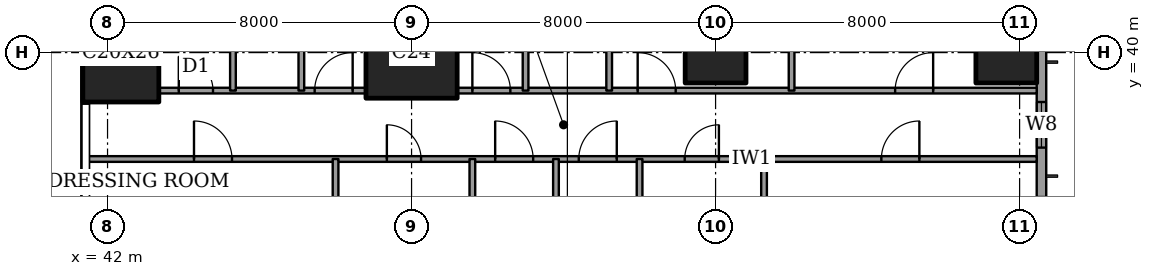
"""IFC4 building model, lengths in metres.
Left out: names, types, materials, properties, quantities, classifications, styles, units other than length and angle.
Written with IfcOpenShell. Run it as: python <this file> out.ifc"""

import sys

from ifc_helpers import new_model, si_unit, direction, frame, frame_2d, origin, origin_2d, place, context, subcontext, project, spatial, rectangle, extrude, element, fill, save


model = new_model("IFC4")
c1 = context("Model", 3, precision=1e-05, world=origin(), true_north=direction((0.0, 1.0)))
c2 = subcontext(c1, "Body", "Model", "MODEL_VIEW")
j1 = project(units=[si_unit("LENGTHUNIT", "METRE"), si_unit("PLANEANGLEUNIT", "RADIAN")], contexts=[c1])
p1 = place(None, origin())
s1 = spatial("IfcSite", under=j1, at=p1, CompositionType="ELEMENT")
p2 = place(p1, origin())
s2 = spatial("IfcBuilding", under=s1, at=p2, CompositionType="ELEMENT")
p3 = place(p2, frame((0.0, 0.0, 241.2)))
s3 = spatial("IfcBuildingStorey", under=s2, at=p3, CompositionType="ELEMENT", Elevation=241.2)
p4 = place(p3, frame((42.35, 40.0, 0.0), z_axis=(0.0, 0.0, 1.0), x_axis=(1.0, 0.0, 0.0)))
e1 = element("IfcColumn", 1, at=p4, inside=s3, PredefinedType="COLUMN", context=c2, shape_type="SweptSolid", body=[
    extrude(rectangle(XDim=2.0, YDim=2.6, at=origin_2d()), origin(), (0.0, 0.0, 1.0), 3.6),
])
p5 = place(p3, frame((50.0, 40.0, 0.0), z_axis=(0.0, 0.0, 1.0), x_axis=(1.0, 0.0, 0.0)))
e2 = element("IfcColumn", 2, at=p5, inside=s3, PredefinedType="COLUMN", context=c2, shape_type="SweptSolid", body=[
    extrude(rectangle(XDim=2.4, YDim=2.4, at=origin_2d()), origin(), (0.0, 0.0, 1.0), 3.6),
])
for number, where, z_axis, x_axis in (
    (3, (58.0, 40.0, 0.0), (0.0, 0.0, 1.0), (1.0, 0.0, 0.0)),
    (4, (65.65, 40.0, 0.0), (0.0, 0.0, 1.0), (1.0, 0.0, 0.0)),
):
    element("IfcColumn", number, at=place(p3, frame(where, z_axis=z_axis, x_axis=x_axis)), inside=s3, PredefinedType="COLUMN", context=c2, shape_type="SweptSolid", body=[
        extrude(rectangle(XDim=1.6, YDim=1.6, at=origin_2d()), origin(), (0.0, 0.0, 1.0), 3.6),
    ])
p6 = place(p3, frame((66.575, 3.175, 0.0), z_axis=(0.0, 0.0, 1.0), x_axis=(0.0, 1.0, 0.0)))
e5 = element("IfcWall", 5, at=p6, inside=s3, PredefinedType="SOLIDWALL", context=c2, shape_type="SweptSolid", body=[
    extrude(rectangle(XDim=41.65, YDim=0.25, at=frame_2d((20.825, 0.0))), origin(), (0.0, 0.0, 1.0), 3.6),
])
p7 = place(p6, frame((0.875, 0.0, 0.6)))
e6 = element("IfcOpeningElement", 6, at=p7, cuts=e5, PredefinedType="OPENING", context=c2, shape_type="SweptSolid", body=[
    extrude(rectangle(XDim=2.4, YDim=2.0, at=frame_2d((1.2, 1.0))), frame((0.0, 0.135, 0.0), z_axis=(0.0, -1.0, 0.0), x_axis=(1.0, 0.0, 0.0)), (0.0, 0.0, 1.0), 0.27),
])
p8 = place(p6, frame((6.0, 0.0, 0.6)))
e7 = element("IfcOpeningElement", 7, at=p8, cuts=e5, PredefinedType="OPENING", context=c2, shape_type="SweptSolid", body=[
    extrude(rectangle(XDim=1.2, YDim=2.0, at=frame_2d((0.6, 1.0))), frame((0.0, 0.135, 0.0), z_axis=(0.0, -1.0, 0.0), x_axis=(1.0, 0.0, 0.0)), (0.0, 0.0, 1.0), 0.27),
])
p9 = place(p6, frame((8.525, 0.0, 0.6)))
e8 = element("IfcOpeningElement", 8, at=p9, cuts=e5, PredefinedType="OPENING", context=c2, shape_type="SweptSolid", body=[
    extrude(rectangle(XDim=2.4, YDim=2.0, at=frame_2d((1.2, 1.0))), frame((0.0, 0.135, 0.0), z_axis=(0.0, -1.0, 0.0), x_axis=(1.0, 0.0, 0.0)), (0.0, 0.0, 1.0), 0.27),
])
p10 = place(p6, frame((15.725, 0.0, 0.6)))
e9 = element("IfcOpeningElement", 9, at=p10, cuts=e5, PredefinedType="OPENING", context=c2, shape_type="SweptSolid", body=[
    extrude(rectangle(XDim=2.4, YDim=2.0, at=frame_2d((1.2, 1.0))), frame((0.0, 0.135, 0.0), z_axis=(0.0, -1.0, 0.0), x_axis=(1.0, 0.0, 0.0)), (0.0, 0.0, 1.0), 0.27),
])
p11 = place(p6, frame((23.525, 0.0, 0.6)))
e10 = element("IfcOpeningElement", 10, at=p11, cuts=e5, PredefinedType="OPENING", context=c2, shape_type="SweptSolid", body=[
    extrude(rectangle(XDim=2.4, YDim=2.0, at=frame_2d((1.2, 1.0))), frame((0.0, 0.135, 0.0), z_axis=(0.0, -1.0, 0.0), x_axis=(1.0, 0.0, 0.0)), (0.0, 0.0, 1.0), 0.27),
])
p12 = place(p6, frame((30.625, 0.0, 0.6)))
e11 = element("IfcOpeningElement", 11, at=p12, cuts=e5, PredefinedType="OPENING", context=c2, shape_type="SweptSolid", body=[
    extrude(rectangle(XDim=2.4, YDim=2.0, at=frame_2d((1.2, 1.0))), frame((0.0, 0.135, 0.0), z_axis=(0.0, -1.0, 0.0), x_axis=(1.0, 0.0, 0.0)), (0.0, 0.0, 1.0), 0.27),
])
p13 = place(p6, frame((34.325, 0.0, 0.6)))
e12 = element("IfcOpeningElement", 12, at=p13, cuts=e5, PredefinedType="OPENING", context=c2, shape_type="SweptSolid", body=[
    extrude(rectangle(XDim=1.2, YDim=2.0, at=frame_2d((0.6, 1.0))), frame((0.0, 0.135, 0.0), z_axis=(0.0, -1.0, 0.0), x_axis=(1.0, 0.0, 0.0)), (0.0, 0.0, 1.0), 0.27),
])
p14 = place(p6, frame((38.375, 0.0, 0.6)))
e13 = element("IfcOpeningElement", 13, at=p14, cuts=e5, PredefinedType="OPENING", context=c2, shape_type="SweptSolid", body=[
    extrude(rectangle(XDim=2.4, YDim=2.0, at=frame_2d((1.2, 1.0))), frame((0.0, 0.135, 0.0), z_axis=(0.0, -1.0, 0.0), x_axis=(1.0, 0.0, 0.0)), (0.0, 0.0, 1.0), 0.27),
])
p15 = place(p3, frame((41.439, 37.2, 0.0), z_axis=(0.0, 0.0, 1.0), x_axis=(1.0, 0.0, 0.0)))
e14 = element("IfcWall", 14, at=p15, inside=s3, PredefinedType="PARTITIONING", context=c2, shape_type="SweptSolid", body=[
    extrude(rectangle(XDim=25.011, YDim=0.15, at=frame_2d((12.505, 0.0))), origin(), (0.0, 0.0, 1.0), 3.35),
])
p16 = place(p15, frame((10.761, 0.0, 0.0)))
e15 = element("IfcOpeningElement", 15, at=p16, cuts=e14, PredefinedType="OPENING", context=c2, shape_type="SweptSolid", body=[
    extrude(rectangle(XDim=1.0, YDim=2.1, at=frame_2d((0.5, 1.05))), frame((0.0, 0.085, 0.0), z_axis=(0.0, -1.0, 0.0), x_axis=(1.0, 0.0, 0.0)), (0.0, 0.0, 1.0), 0.17),
])
p17 = place(p15, frame((20.924, 0.0, 0.0)))
e16 = element("IfcOpeningElement", 16, at=p17, cuts=e14, PredefinedType="OPENING", context=c2, shape_type="SweptSolid", body=[
    extrude(rectangle(XDim=1.0, YDim=2.1, at=frame_2d((0.5, 1.05))), frame((0.0, 0.085, 0.0), z_axis=(0.0, -1.0, 0.0), x_axis=(1.0, 0.0, 0.0)), (0.0, 0.0, 1.0), 0.17),
])
p18 = place(p15, frame((15.749, 0.0, 0.0)))
e17 = element("IfcOpeningElement", 17, at=p18, cuts=e14, PredefinedType="OPENING", context=c2, shape_type="SweptSolid", body=[
    extrude(rectangle(XDim=0.9, YDim=2.1, at=frame_2d((0.45, 1.05))), frame((0.0, 0.085, 0.0), z_axis=(0.0, -1.0, 0.0), x_axis=(1.0, 0.0, 0.0)), (0.0, 0.0, 1.0), 0.17),
])
p19 = place(p15, frame((12.961, 0.0, 0.0)))
e18 = element("IfcOpeningElement", 18, at=p19, cuts=e14, PredefinedType="OPENING", context=c2, shape_type="SweptSolid", body=[
    extrude(rectangle(XDim=1.0, YDim=2.1, at=frame_2d((0.5, 1.05))), frame((0.0, 0.085, 0.0), z_axis=(0.0, -1.0, 0.0), x_axis=(1.0, 0.0, 0.0)), (0.0, 0.0, 1.0), 0.17),
])
p20 = place(p15, frame((7.911, 0.0, 0.0)))
e19 = element("IfcOpeningElement", 19, at=p20, cuts=e14, PredefinedType="OPENING", context=c2, shape_type="SweptSolid", body=[
    extrude(rectangle(XDim=0.9, YDim=2.1, at=frame_2d((0.45, 1.05))), frame((0.0, 0.085, 0.0), z_axis=(0.0, -1.0, 0.0), x_axis=(1.0, 0.0, 0.0)), (0.0, 0.0, 1.0), 0.17),
])
p21 = place(p15, frame((2.836, 0.0, 0.0)))
e20 = element("IfcOpeningElement", 20, at=p21, cuts=e14, PredefinedType="OPENING", context=c2, shape_type="SweptSolid", body=[
    extrude(rectangle(XDim=1.0, YDim=2.1, at=frame_2d((0.5, 1.05))), frame((0.0, 0.085, 0.0), z_axis=(0.0, -1.0, 0.0), x_axis=(1.0, 0.0, 0.0)), (0.0, 0.0, 1.0), 0.17),
])
p22 = place(p3, frame((43.35, 39.0, 0.0), z_axis=(0.0, 0.0, 1.0), x_axis=(1.0, 0.0, 0.0)))
e21 = element("IfcWall", 21, at=p22, inside=s3, PredefinedType="PARTITIONING", context=c2, shape_type="SweptSolid", body=[
    extrude(rectangle(XDim=5.45, YDim=0.15, at=frame_2d((2.725, 0.0))), origin(), (0.0, 0.0, 1.0), 3.35),
])
p23 = place(p22, frame((4.1, 0.0, 0.0)))
e22 = element("IfcOpeningElement", 22, at=p23, cuts=e21, PredefinedType="OPENING", context=c2, shape_type="SweptSolid", body=[
    extrude(rectangle(XDim=1.0, YDim=2.1, at=frame_2d((0.5, 1.05))), frame((0.0, 0.085, 0.0), z_axis=(0.0, -1.0, 0.0), x_axis=(1.0, 0.0, 0.0)), (0.0, 0.0, 1.0), 0.17),
])
p24 = place(p22, frame((0.525, 0.0, 0.0)))
e23 = element("IfcOpeningElement", 23, at=p24, cuts=e21, PredefinedType="OPENING", context=c2, shape_type="SweptSolid", body=[
    extrude(rectangle(XDim=0.9, YDim=2.1, at=frame_2d((0.45, 1.05))), frame((0.0, 0.085, 0.0), z_axis=(0.0, -1.0, 0.0), x_axis=(1.0, 0.0, 0.0)), (0.0, 0.0, 1.0), 0.17),
])
p25 = place(p3, frame((51.2, 39.0, 0.0), z_axis=(0.0, 0.0, 1.0), x_axis=(1.0, 0.0, 0.0)))
e24 = element("IfcWall", 24, at=p25, inside=s3, PredefinedType="PARTITIONING", context=c2, shape_type="SweptSolid", body=[
    extrude(rectangle(XDim=15.25, YDim=0.15, at=frame_2d((7.625, 0.0))), origin(), (0.0, 0.0, 1.0), 3.35),
])
p26 = place(p25, frame((11.525, 0.0, 0.0)))
e25 = element("IfcOpeningElement", 25, at=p26, cuts=e24, PredefinedType="OPENING", context=c2, shape_type="SweptSolid", body=[
    extrude(rectangle(XDim=1.0, YDim=2.1, at=frame_2d((0.5, 1.05))), frame((0.0, 0.085, 0.0), z_axis=(0.0, -1.0, 0.0), x_axis=(1.0, 0.0, 0.0)), (0.0, 0.0, 1.0), 0.17),
])
p27 = place(p25, frame((4.75, 0.0, 0.0)))
e26 = element("IfcOpeningElement", 26, at=p27, cuts=e24, PredefinedType="OPENING", context=c2, shape_type="SweptSolid", body=[
    extrude(rectangle(XDim=1.0, YDim=2.1, at=frame_2d((0.5, 1.05))), frame((0.0, 0.085, 0.0), z_axis=(0.0, -1.0, 0.0), x_axis=(1.0, 0.0, 0.0)), (0.0, 0.0, 1.0), 0.17),
])
p28 = place(p25, frame((0.4, 0.0, 0.0)))
e27 = element("IfcOpeningElement", 27, at=p28, cuts=e24, PredefinedType="OPENING", context=c2, shape_type="SweptSolid", body=[
    extrude(rectangle(XDim=1.0, YDim=2.1, at=frame_2d((0.5, 1.05))), frame((0.0, 0.085, 0.0), z_axis=(0.0, -1.0, 0.0), x_axis=(1.0, 0.0, 0.0)), (0.0, 0.0, 1.0), 0.17),
])
p29 = place(p3, frame((45.3, 39.0, 0.0), z_axis=(0.0, 0.0, 1.0), x_axis=(0.0, 1.0, 0.0)))
e28 = element("IfcWall", 28, at=p29, inside=s3, PredefinedType="PARTITIONING", context=c2, shape_type="SweptSolid", body=[
    extrude(rectangle(XDim=9.45, YDim=0.15, at=frame_2d((4.725, 0.0))), origin(), (0.0, 0.0, 1.0), 3.35),
])
p30 = place(p3, frame((47.1, 39.0, 0.0), z_axis=(0.0, 0.0, 1.0), x_axis=(0.0, 1.0, 0.0)))
e29 = element("IfcWall", 29, at=p30, inside=s3, PredefinedType="PARTITIONING", context=c2, shape_type="SweptSolid", body=[
    extrude(rectangle(XDim=4.7, YDim=0.15, at=frame_2d((2.35, 0.0))), origin(), (0.0, 0.0, 1.0), 3.35),
])
p31 = place(p30, frame((1.9, 0.0, 0.0)))
e30 = element("IfcOpeningElement", 30, at=p31, cuts=e29, PredefinedType="OPENING", context=c2, shape_type="SweptSolid", body=[
    extrude(rectangle(XDim=0.9, YDim=2.1, at=frame_2d((0.45, 1.05))), frame((0.0, 0.085, 0.0), z_axis=(0.0, -1.0, 0.0), x_axis=(1.0, 0.0, 0.0)), (0.0, 0.0, 1.0), 0.17),
])
p32 = place(p3, frame((48.0, 28.0, 0.0), z_axis=(0.0, 0.0, 1.0), x_axis=(0.0, 1.0, 0.0)))
e31 = element("IfcWall", 31, at=p32, inside=s3, PredefinedType="PARTITIONING", context=c2, shape_type="SweptSolid", body=[
    extrude(rectangle(XDim=9.2, YDim=0.15, at=frame_2d((4.6, 0.0))), origin(), (0.0, 0.0, 1.0), 3.35),
])
p33 = place(p32, frame((0.5, 0.0, 0.0)))
e32 = element("IfcOpeningElement", 32, at=p33, cuts=e31, PredefinedType="OPENING", context=c2, shape_type="SweptSolid", body=[
    extrude(rectangle(XDim=1.0, YDim=2.1, at=frame_2d((0.5, 1.05))), frame((0.0, 0.085, 0.0), z_axis=(0.0, -1.0, 0.0), x_axis=(1.0, 0.0, 0.0)), (0.0, 0.0, 1.0), 0.17),
])
p34 = place(p3, frame((51.6, 30.0, 0.0), z_axis=(0.0, 0.0, 1.0), x_axis=(0.0, 1.0, 0.0)))
e33 = element("IfcWall", 33, at=p34, inside=s3, PredefinedType="PARTITIONING", context=c2, shape_type="SweptSolid", body=[
    extrude(rectangle(XDim=7.2, YDim=0.15, at=frame_2d((3.6, 0.0))), origin(), (0.0, 0.0, 1.0), 3.35),
])
p35 = place(p3, frame((53.0, 39.0, 0.0), z_axis=(0.0, 0.0, 1.0), x_axis=(0.0, 1.0, 0.0)))
e34 = element("IfcWall", 34, at=p35, inside=s3, PredefinedType="PARTITIONING", context=c2, shape_type="SweptSolid", body=[
    extrude(rectangle(XDim=9.45, YDim=0.15, at=frame_2d((4.725, 0.0))), origin(), (0.0, 0.0, 1.0), 3.35),
])
p36 = place(p3, frame((53.8, 30.0, 0.0), z_axis=(0.0, 0.0, 1.0), x_axis=(0.0, 1.0, 0.0)))
e35 = element("IfcWall", 35, at=p36, inside=s3, PredefinedType="PARTITIONING", context=c2, shape_type="SweptSolid", body=[
    extrude(rectangle(XDim=7.2, YDim=0.15, at=frame_2d((3.6, 0.0))), origin(), (0.0, 0.0, 1.0), 3.35),
])
p37 = place(p3, frame((55.2, 39.0, 0.0), z_axis=(0.0, 0.0, 1.0), x_axis=(0.0, 1.0, 0.0)))
e36 = element("IfcWall", 36, at=p37, inside=s3, PredefinedType="PARTITIONING", context=c2, shape_type="SweptSolid", body=[
    extrude(rectangle(XDim=3.4, YDim=0.15, at=frame_2d((1.7, 0.0))), origin(), (0.0, 0.0, 1.0), 3.35),
])
p38 = place(p37, frame((1.25, 0.0, 0.0)))
e37 = element("IfcOpeningElement", 37, at=p38, cuts=e36, PredefinedType="OPENING", context=c2, shape_type="SweptSolid", body=[
    extrude(rectangle(XDim=0.9, YDim=2.1, at=frame_2d((0.45, 1.05))), frame((0.0, 0.085, 0.0), z_axis=(0.0, -1.0, 0.0), x_axis=(1.0, 0.0, 0.0)), (0.0, 0.0, 1.0), 0.17),
])
p39 = place(p3, frame((56.0, 28.0, 0.0), z_axis=(0.0, 0.0, 1.0), x_axis=(0.0, 1.0, 0.0)))
e38 = element("IfcWall", 38, at=p39, inside=s3, PredefinedType="PARTITIONING", context=c2, shape_type="SweptSolid", body=[
    extrude(rectangle(XDim=9.2, YDim=0.15, at=frame_2d((4.6, 0.0))), origin(), (0.0, 0.0, 1.0), 3.35),
])
p40 = place(p39, frame((0.5, 0.0, 0.0)))
e39 = element("IfcOpeningElement", 39, at=p40, cuts=e38, PredefinedType="OPENING", context=c2, shape_type="SweptSolid", body=[
    extrude(rectangle(XDim=1.0, YDim=2.1, at=frame_2d((0.5, 1.05))), frame((0.0, 0.085, 0.0), z_axis=(0.0, -1.0, 0.0), x_axis=(1.0, 0.0, 0.0)), (0.0, 0.0, 1.0), 0.17),
])
p41 = place(p3, frame((59.275, 33.2, 0.0), z_axis=(0.0, 0.0, 1.0), x_axis=(0.0, 1.0, 0.0)))
e40 = element("IfcWall", 40, at=p41, inside=s3, PredefinedType="PARTITIONING", context=c2, shape_type="SweptSolid", body=[
    extrude(rectangle(XDim=4.0, YDim=0.15, at=frame_2d((2.0, 0.0))), origin(), (0.0, 0.0, 1.0), 3.35),
])
p42 = place(p3, frame((60.0, 39.0, 0.0), z_axis=(0.0, 0.0, 1.0), x_axis=(0.0, 1.0, 0.0)))
e41 = element("IfcWall", 41, at=p42, inside=s3, PredefinedType="PARTITIONING", context=c2, shape_type="SweptSolid", body=[
    extrude(rectangle(XDim=9.45, YDim=0.15, at=frame_2d((4.725, 0.0))), origin(), (0.0, 0.0, 1.0), 3.35),
])
p43 = place(p13, origin())
e42 = element("IfcWindow", 42, at=p43, inside=s3, PartitioningType="SINGLE_PANEL", PredefinedType="WINDOW", context=c2, shape_type="SweptSolid", body=[
    extrude(rectangle(XDim=1.2, YDim=2.0, at=frame_2d((0.6, 1.0))), frame((0.0, 0.03, 0.0), z_axis=(0.0, -1.0, 0.0), x_axis=(1.0, 0.0, 0.0)), (0.0, 0.0, 1.0), 0.06),
])
fill(e12, e42)
p44 = place(p26, origin())
e43 = element("IfcDoor", 43, at=p44, inside=s3, OperationType="SINGLE_SWING_LEFT", PredefinedType="DOOR", context=c2, shape_type="SweptSolid", body=[
    extrude(rectangle(XDim=1.0, YDim=2.1, at=frame_2d((0.5, 1.05))), frame((0.0, 0.025, 0.0), z_axis=(0.0, -1.0, 0.0), x_axis=(1.0, 0.0, 0.0)), (0.0, 0.0, 1.0), 0.05),
])
fill(e25, e43)
p45 = place(p27, origin())
e44 = element("IfcDoor", 44, at=p45, inside=s3, OperationType="SINGLE_SWING_RIGHT", PredefinedType="DOOR", context=c2, shape_type="SweptSolid", body=[
    extrude(rectangle(XDim=1.0, YDim=2.1, at=frame_2d((0.5, 1.05))), frame((0.0, 0.025, 0.0), z_axis=(0.0, -1.0, 0.0), x_axis=(1.0, 0.0, 0.0)), (0.0, 0.0, 1.0), 0.05),
])
fill(e26, e44)
p46 = place(p28, origin())
e45 = element("IfcDoor", 45, at=p46, inside=s3, OperationType="SINGLE_SWING_RIGHT", PredefinedType="DOOR", context=c2, shape_type="SweptSolid", body=[
    extrude(rectangle(XDim=1.0, YDim=2.1, at=frame_2d((0.5, 1.05))), frame((0.0, 0.025, 0.0), z_axis=(0.0, -1.0, 0.0), x_axis=(1.0, 0.0, 0.0)), (0.0, 0.0, 1.0), 0.05),
])
fill(e27, e45)
p47 = place(p23, origin())
e46 = element("IfcDoor", 46, at=p47, inside=s3, OperationType="SINGLE_SWING_LEFT", PredefinedType="DOOR", context=c2, shape_type="SweptSolid", body=[
    extrude(rectangle(XDim=1.0, YDim=2.1, at=frame_2d((0.5, 1.05))), frame((0.0, 0.025, 0.0), z_axis=(0.0, -1.0, 0.0), x_axis=(1.0, 0.0, 0.0)), (0.0, 0.0, 1.0), 0.05),
])
fill(e22, e46)
p48 = place(p24, origin())
e47 = element("IfcDoor", 47, at=p48, inside=s3, OperationType="SINGLE_SWING_RIGHT", PredefinedType="DOOR", context=c2, shape_type="SweptSolid", body=[
    extrude(rectangle(XDim=0.9, YDim=2.1, at=frame_2d((0.45, 1.05))), frame((0.0, 0.025, 0.0), z_axis=(0.0, -1.0, 0.0), x_axis=(1.0, 0.0, 0.0)), (0.0, 0.0, 1.0), 0.05),
])
fill(e23, e47)
p49 = place(p16, origin())
e48 = element("IfcDoor", 48, at=p49, inside=s3, OperationType="SINGLE_SWING_RIGHT", PredefinedType="DOOR", context=c2, shape_type="SweptSolid", body=[
    extrude(rectangle(XDim=1.0, YDim=2.1, at=frame_2d((0.5, 1.05))), frame((0.0, 0.025, 0.0), z_axis=(0.0, -1.0, 0.0), x_axis=(1.0, 0.0, 0.0)), (0.0, 0.0, 1.0), 0.05),
])
fill(e15, e48)
p50 = place(p17, origin())
e49 = element("IfcDoor", 49, at=p50, inside=s3, OperationType="SINGLE_SWING_LEFT", PredefinedType="DOOR", context=c2, shape_type="SweptSolid", body=[
    extrude(rectangle(XDim=1.0, YDim=2.1, at=frame_2d((0.5, 1.05))), frame((0.0, 0.025, 0.0), z_axis=(0.0, -1.0, 0.0), x_axis=(1.0, 0.0, 0.0)), (0.0, 0.0, 1.0), 0.05),
])
fill(e16, e49)
p51 = place(p18, origin())
e50 = element("IfcDoor", 50, at=p51, inside=s3, OperationType="SINGLE_SWING_LEFT", PredefinedType="DOOR", context=c2, shape_type="SweptSolid", body=[
    extrude(rectangle(XDim=0.9, YDim=2.1, at=frame_2d((0.45, 1.05))), frame((0.0, 0.025, 0.0), z_axis=(0.0, -1.0, 0.0), x_axis=(1.0, 0.0, 0.0)), (0.0, 0.0, 1.0), 0.05),
])
fill(e17, e50)
p52 = place(p19, origin())
e51 = element("IfcDoor", 51, at=p52, inside=s3, OperationType="SINGLE_SWING_LEFT", PredefinedType="DOOR", context=c2, shape_type="SweptSolid", body=[
    extrude(rectangle(XDim=1.0, YDim=2.1, at=frame_2d((0.5, 1.05))), frame((0.0, 0.025, 0.0), z_axis=(0.0, -1.0, 0.0), x_axis=(1.0, 0.0, 0.0)), (0.0, 0.0, 1.0), 0.05),
])
fill(e18, e51)
p53 = place(p20, origin())
e52 = element("IfcDoor", 52, at=p53, inside=s3, OperationType="SINGLE_SWING_RIGHT", PredefinedType="DOOR", context=c2, shape_type="SweptSolid", body=[
    extrude(rectangle(XDim=0.9, YDim=2.1, at=frame_2d((0.45, 1.05))), frame((0.0, 0.025, 0.0), z_axis=(0.0, -1.0, 0.0), x_axis=(1.0, 0.0, 0.0)), (0.0, 0.0, 1.0), 0.05),
])
fill(e19, e52)
p54 = place(p21, origin())
e53 = element("IfcDoor", 53, at=p54, inside=s3, OperationType="SINGLE_SWING_RIGHT", PredefinedType="DOOR", context=c2, shape_type="SweptSolid", body=[
    extrude(rectangle(XDim=1.0, YDim=2.1, at=frame_2d((0.5, 1.05))), frame((0.0, 0.025, 0.0), z_axis=(0.0, -1.0, 0.0), x_axis=(1.0, 0.0, 0.0)), (0.0, 0.0, 1.0), 0.05),
])
fill(e20, e53)
save(model, sys.argv[1])
